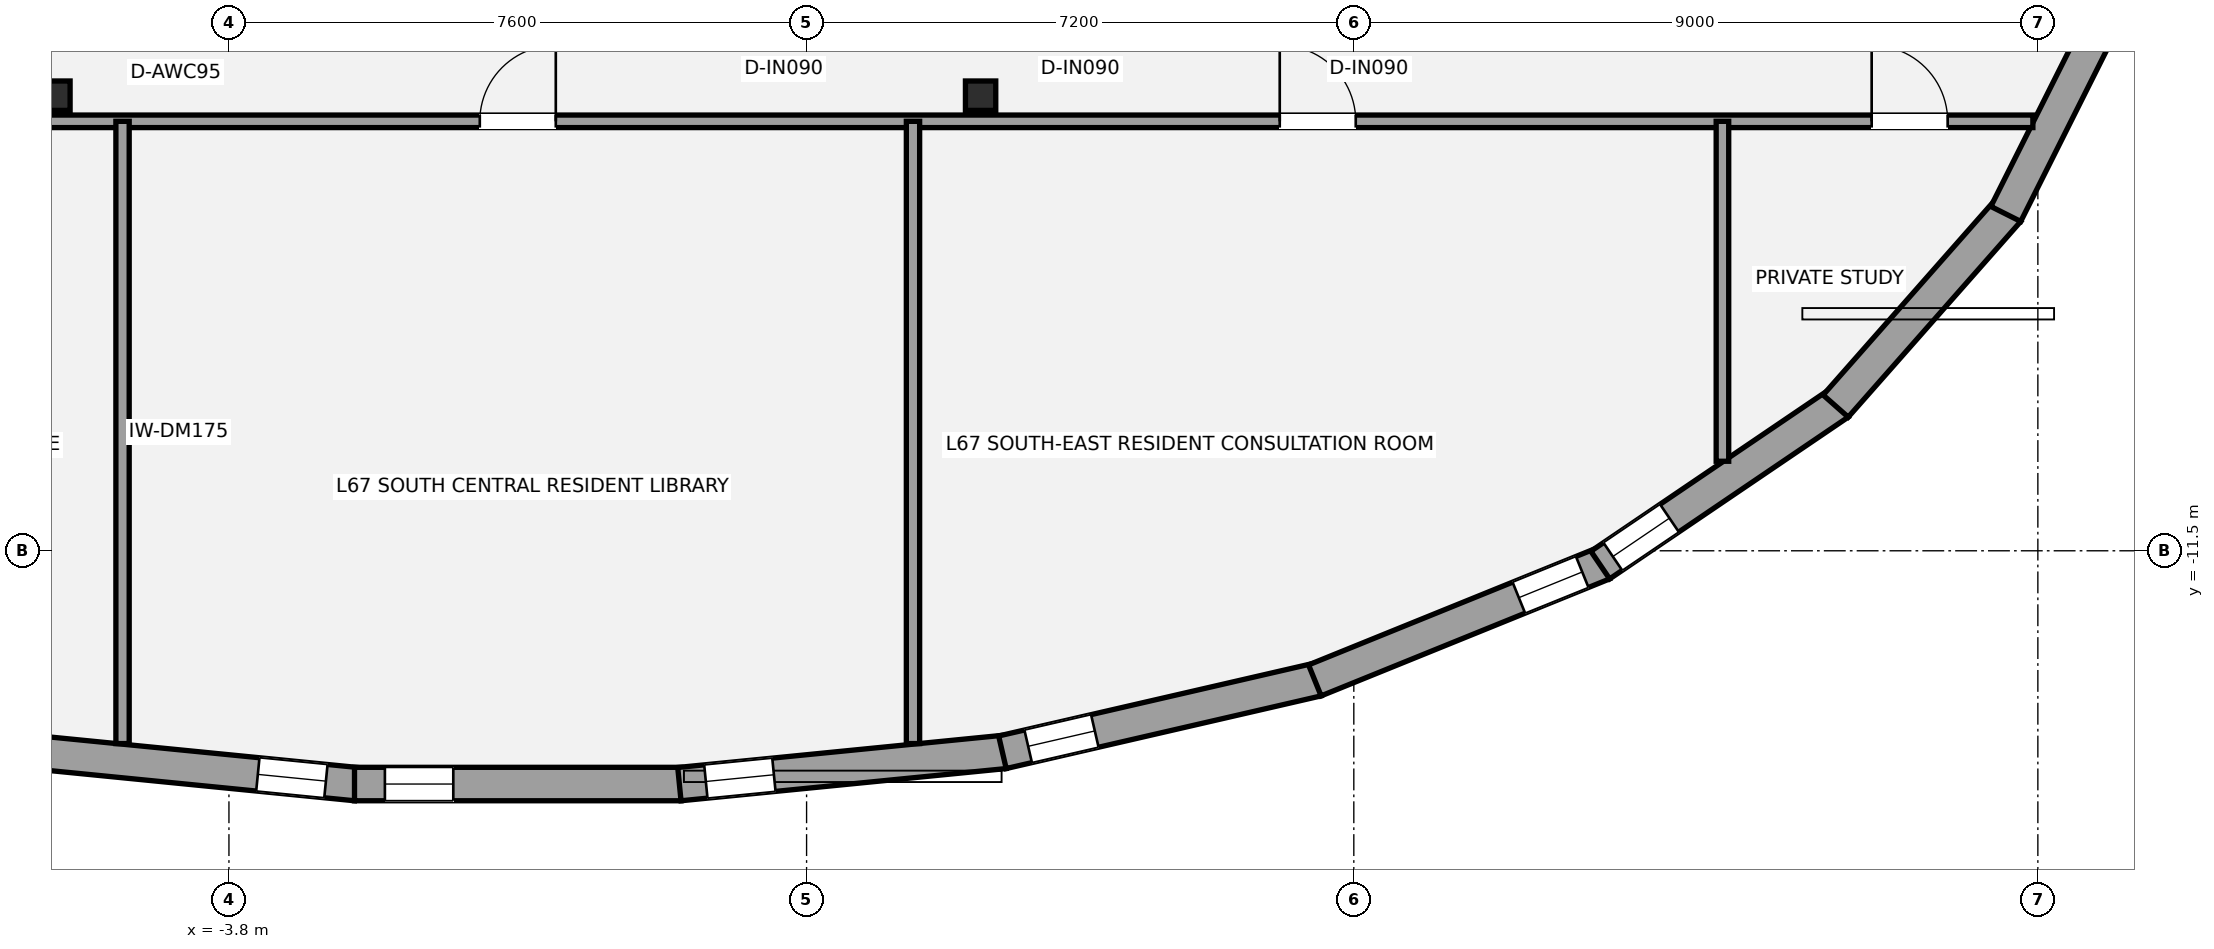
"""IFC4 building model, lengths in metres.
Left out: names, types, materials, properties, quantities, classifications, styles, units other than length and angle.
Written with IfcOpenShell. Run it as: python <this file> out.ifc"""

import sys

from ifc_helpers import new_model, si_unit, direction, frame, frame_2d, origin, origin_2d, place, context, subcontext, project, spatial, rectangle, i_section, extrude, element, fill, save


model = new_model("IFC4")
c1 = context("Model", 3, precision=1e-05, world=origin(), true_north=direction((0.0, 1.0)))
c2 = subcontext(c1, "Body", "Model", "MODEL_VIEW")
j1 = project(units=[si_unit("LENGTHUNIT", "METRE"), si_unit("PLANEANGLEUNIT", "RADIAN")], contexts=[c1])
p1 = place(None, origin())
s1 = spatial("IfcSite", under=j1, at=p1, CompositionType="ELEMENT")
p2 = place(p1, origin())
s2 = spatial("IfcBuilding", under=s1, at=p2, CompositionType="ELEMENT")
p3 = place(p2, frame((0.0, 0.0, 238.35)))
s3 = spatial("IfcBuildingStorey", under=s2, at=p3, CompositionType="ELEMENT", Elevation=238.35)
for number, where, z_axis, x_axis in (
    (1, (-6.09, -5.513, 0.0), (0.0, 0.0, 1.0), (1.0, 0.0, 0.0)),
    (2, (6.09, -5.513, 0.0), (0.0, 0.0, 1.0), (1.0, 0.0, 0.0)),
):
    element("IfcColumn", number, at=place(p3, frame(where, z_axis=z_axis, x_axis=x_axis)), inside=s3, PredefinedType="COLUMN", context=c2, shape_type="SweptSolid", body=[
        extrude(i_section(OverallWidth=0.399, OverallDepth=0.387, WebThickness=0.021, FlangeThickness=0.033, at=origin_2d()), origin(), (0.0, 0.0, 1.0), 3.15),
    ])
p4 = place(p3, frame((-2.126, -14.57, 0.0), z_axis=(0.0, 0.0, 1.0), x_axis=(-0.995134540264, 0.098525361068, 0.0)))
e3 = element("IfcWall", 3, at=p4, inside=s3, PredefinedType="STANDARD", context=c2, shape_type="SweptSolid", body=[
    extrude(rectangle(XDim=4.299, YDim=0.44, at=frame_2d((2.15, 0.0))), origin(), (0.0, 0.0, 1.0), 2.336),
])
p5 = place(p4, frame((0.4, 0.0, 0.58)))
e4 = element("IfcOpeningElement", 4, at=p5, cuts=e3, PredefinedType="OPENING", context=c2, shape_type="SweptSolid", body=[
    extrude(rectangle(XDim=0.9, YDim=1.35, at=frame_2d((0.45, 0.675))), frame((0.0, 0.23, 0.0), z_axis=(0.0, -1.0, 0.0), x_axis=(1.0, 0.0, 0.0)), (0.0, 0.0, 1.0), 0.46),
])
p6 = place(p3, frame((2.148, -14.569, 0.0), z_axis=(0.0, 0.0, 1.0), x_axis=(-1.0, 0.0, 0.0)))
e5 = element("IfcWall", 5, at=p6, inside=s3, PredefinedType="STANDARD", context=c2, shape_type="SweptSolid", body=[
    extrude(rectangle(XDim=4.296, YDim=0.44, at=frame_2d((2.148, 0.0))), origin(), (0.0, 0.0, 1.0), 2.336),
])
p7 = place(p6, frame((2.996, 0.0, 0.58)))
e6 = element("IfcOpeningElement", 6, at=p7, cuts=e5, PredefinedType="OPENING", context=c2, shape_type="SweptSolid", body=[
    extrude(rectangle(XDim=0.9, YDim=1.35, at=frame_2d((0.45, 0.675))), frame((0.0, 0.23, 0.0), z_axis=(0.0, -1.0, 0.0), x_axis=(1.0, 0.0, 0.0)), (0.0, 0.0, 1.0), 0.46),
])
p8 = place(p3, frame((6.405, -14.146, 0.0), z_axis=(0.0, 0.0, 1.0), x_axis=(-0.995134540264, -0.098525361068, 0.0)))
e7 = element("IfcWall", 7, at=p8, inside=s3, PredefinedType="STANDARD", context=c2, shape_type="SweptSolid", body=[
    extrude(rectangle(XDim=4.299, YDim=0.44, at=frame_2d((2.15, 0.0))), origin(), (0.0, 0.0, 1.0), 2.336),
])
p9 = place(p8, frame((3.049, 0.0, 0.58)))
e8 = element("IfcOpeningElement", 8, at=p9, cuts=e7, PredefinedType="OPENING", context=c2, shape_type="SweptSolid", body=[
    extrude(rectangle(XDim=0.9, YDim=1.35, at=frame_2d((0.45, 0.675))), frame((0.0, 0.23, 0.0), z_axis=(0.0, -1.0, 0.0), x_axis=(1.0, 0.0, 0.0)), (0.0, 0.0, 1.0), 0.46),
])
p10 = place(p3, frame((10.52, -13.195, 0.0), z_axis=(0.0, 0.0, 1.0), x_axis=(-0.974398936081, -0.224825962391, 0.0)))
e9 = element("IfcWall", 9, at=p10, inside=s3, PredefinedType="STANDARD", context=c2, shape_type="SweptSolid", body=[
    extrude(rectangle(XDim=4.252, YDim=0.44, at=frame_2d((2.126, 0.0))), origin(), (0.0, 0.0, 1.0), 2.336),
])
p11 = place(p10, frame((3.005, 0.0, 0.58)))
e10 = element("IfcOpeningElement", 10, at=p11, cuts=e9, PredefinedType="OPENING", context=c2, shape_type="SweptSolid", body=[
    extrude(rectangle(XDim=0.9, YDim=1.35, at=frame_2d((0.45, 0.675))), frame((0.0, 0.23, 0.0), z_axis=(0.0, -1.0, 0.0), x_axis=(1.0, 0.0, 0.0)), (0.0, 0.0, 1.0), 0.46),
])
p12 = place(p3, frame((14.283, -11.666, 0.0), z_axis=(0.0, 0.0, 1.0), x_axis=(-0.926731976866, -0.375723093586, 0.0)))
e11 = element("IfcWall", 11, at=p12, inside=s3, PredefinedType="STANDARD", context=c2, shape_type="SweptSolid", body=[
    extrude(rectangle(XDim=4.096, YDim=0.44, at=frame_2d((2.048, 0.0))), origin(), (0.0, 0.0, 1.0), 2.336),
])
p13 = place(p12, frame((0.3, 0.0, 0.58)))
e12 = element("IfcOpeningElement", 12, at=p13, cuts=e11, PredefinedType="OPENING", context=c2, shape_type="SweptSolid", body=[
    extrude(rectangle(XDim=0.9, YDim=1.35, at=frame_2d((0.45, 0.675))), frame((0.0, 0.23, 0.0), z_axis=(0.0, -1.0, 0.0), x_axis=(1.0, 0.0, 0.0)), (0.0, 0.0, 1.0), 0.46),
])
p14 = place(p3, frame((17.381, -9.559, 0.0), z_axis=(0.0, 0.0, 1.0), x_axis=(-0.827637036896, -0.561263694851, 0.0)))
e13 = element("IfcWall", 13, at=p14, inside=s3, PredefinedType="STANDARD", context=c2, shape_type="SweptSolid", body=[
    extrude(rectangle(XDim=3.793, YDim=0.44, at=frame_2d((1.896, 0.0))), origin(), (0.0, 0.0, 1.0), 2.336),
])
p15 = place(p14, frame((2.693, 0.0, 0.58)))
e14 = element("IfcOpeningElement", 14, at=p15, cuts=e13, PredefinedType="OPENING", context=c2, shape_type="SweptSolid", body=[
    extrude(rectangle(XDim=0.9, YDim=1.35, at=frame_2d((0.45, 0.675))), frame((0.0, 0.23, 0.0), z_axis=(0.0, -1.0, 0.0), x_axis=(1.0, 0.0, 0.0)), (0.0, 0.0, 1.0), 0.46),
])
p16 = place(p3, frame((19.61, -7.022, 0.0), z_axis=(0.0, 0.0, 1.0), x_axis=(-0.66136043846, -0.750068243855, 0.0)))
e15 = element("IfcWall", 15, at=p16, inside=s3, PredefinedType="STANDARD", context=c2, shape_type="SweptSolid", body=[
    extrude(rectangle(XDim=3.432, YDim=0.44, at=frame_2d((1.716, 0.0))), origin(), (0.0, 0.0, 1.0), 2.336),
])
p17 = place(p3, frame((20.988, -4.259, 0.0), z_axis=(0.0, 0.0, 1.0), x_axis=(-0.448424724145, -0.893820601002, 0.0)))
e16 = element("IfcWall", 16, at=p17, inside=s3, PredefinedType="STANDARD", context=c2, shape_type="SweptSolid", body=[
    extrude(rectangle(XDim=3.144, YDim=0.44, at=frame_2d((1.572, 0.0))), origin(), (0.0, 0.0, 1.0), 2.336),
])
p18 = place(p3, frame((-19.935, -5.85, 0.0), z_axis=(0.0, 0.0, 1.0), x_axis=(1.0, 0.0, 0.0)))
e17 = element("IfcWall", 17, at=p18, inside=s3, PredefinedType="PARTITIONING", context=c2, shape_type="SweptSolid", body=[
    extrude(rectangle(XDim=39.869, YDim=0.165, at=frame_2d((19.935, 0.0))), origin(), (0.0, 0.0, 1.0), 2.423),
])
p19 = place(p18, frame((1.221, 0.0, 0.0)))
e18 = element("IfcOpeningElement", 18, at=p19, cuts=e17, PredefinedType="OPENING", context=c2, shape_type="SweptSolid", body=[
    extrude(rectangle(XDim=1.0, YDim=2.15, at=frame_2d((0.5, 1.075))), frame((0.0, 0.093, 0.0), z_axis=(0.0, -1.0, 0.0), x_axis=(1.0, 0.0, 0.0)), (0.0, 0.0, 1.0), 0.185),
])
p20 = place(p18, frame((37.748, 0.0, 0.0)))
e19 = element("IfcOpeningElement", 19, at=p20, cuts=e17, PredefinedType="OPENING", context=c2, shape_type="SweptSolid", body=[
    extrude(rectangle(XDim=1.0, YDim=2.15, at=frame_2d((0.5, 1.075))), frame((0.0, 0.093, 0.0), z_axis=(0.0, -1.0, 0.0), x_axis=(1.0, 0.0, 0.0)), (0.0, 0.0, 1.0), 0.185),
])
p21 = place(p18, frame((9.01, 0.0, 0.0)))
e20 = element("IfcOpeningElement", 20, at=p21, cuts=e17, PredefinedType="OPENING", context=c2, shape_type="SweptSolid", body=[
    extrude(rectangle(XDim=1.0, YDim=2.15, at=frame_2d((0.5, 1.075))), frame((0.0, 0.093, 0.0), z_axis=(0.0, -1.0, 0.0), x_axis=(1.0, 0.0, 0.0)), (0.0, 0.0, 1.0), 0.185),
])
p22 = place(p18, frame((19.435, 0.0, 0.0)))
e21 = element("IfcOpeningElement", 21, at=p22, cuts=e17, PredefinedType="OPENING", context=c2, shape_type="SweptSolid", body=[
    extrude(rectangle(XDim=1.0, YDim=2.15, at=frame_2d((0.5, 1.075))), frame((0.0, 0.093, 0.0), z_axis=(0.0, -1.0, 0.0), x_axis=(1.0, 0.0, 0.0)), (0.0, 0.0, 1.0), 0.185),
])
p23 = place(p18, frame((29.96, 0.0, 0.0)))
e22 = element("IfcOpeningElement", 22, at=p23, cuts=e17, PredefinedType="OPENING", context=c2, shape_type="SweptSolid", body=[
    extrude(rectangle(XDim=1.0, YDim=2.15, at=frame_2d((0.5, 1.075))), frame((0.0, 0.093, 0.0), z_axis=(0.0, -1.0, 0.0), x_axis=(1.0, 0.0, 0.0)), (0.0, 0.0, 1.0), 0.185),
])
p24 = place(p3, frame((15.85, -10.322, 0.0), z_axis=(0.0, 0.0, 1.0), x_axis=(0.0, 1.0, 0.0)))
e23 = element("IfcWall", 23, at=p24, inside=s3, PredefinedType="PARTITIONING", context=c2, shape_type="SweptSolid", body=[
    extrude(rectangle(XDim=4.472, YDim=0.165, at=frame_2d((2.236, 0.0))), origin(), (0.0, 0.0, 1.0), 2.423),
])
p25 = place(p3, frame((-5.2, -14.036, 0.0), z_axis=(0.0, 0.0, 1.0), x_axis=(0.0, 1.0, 0.0)))
e24 = element("IfcWall", 24, at=p25, inside=s3, PredefinedType="PARTITIONING", context=c2, shape_type="SweptSolid", body=[
    extrude(rectangle(XDim=8.186, YDim=0.175, at=frame_2d((4.093, 0.0))), origin(), (0.0, 0.0, 1.0), 2.423),
])
p26 = place(p3, frame((5.2, -14.036, 0.0), z_axis=(0.0, 0.0, 1.0), x_axis=(0.0, 1.0, 0.0)))
e25 = element("IfcWall", 25, at=p26, inside=s3, PredefinedType="PARTITIONING", context=c2, shape_type="SweptSolid", body=[
    extrude(rectangle(XDim=8.186, YDim=0.175, at=frame_2d((4.093, 0.0))), origin(), (0.0, 0.0, 1.0), 2.97),
])
p27 = place(p5, origin())
e26 = element("IfcWindow", 26, at=p27, inside=s3, PartitioningType="SINGLE_PANEL", PredefinedType="WINDOW", context=c2, shape_type="SweptSolid", body=[
    extrude(rectangle(XDim=0.9, YDim=1.35, at=frame_2d((0.45, 0.675))), frame((0.0, -0.01, 0.0), z_axis=(0.0, -1.0, 0.0), x_axis=(1.0, 0.0, 0.0)), (0.0, 0.0, 1.0), 0.06),
])
fill(e4, e26)
p28 = place(p7, origin())
e27 = element("IfcWindow", 27, at=p28, inside=s3, PartitioningType="SINGLE_PANEL", PredefinedType="WINDOW", context=c2, shape_type="SweptSolid", body=[
    extrude(rectangle(XDim=0.9, YDim=1.35, at=frame_2d((0.45, 0.675))), frame((0.0, -0.01, 0.0), z_axis=(0.0, -1.0, 0.0), x_axis=(1.0, 0.0, 0.0)), (0.0, 0.0, 1.0), 0.06),
])
fill(e6, e27)
p29 = place(p9, origin())
e28 = element("IfcWindow", 28, at=p29, inside=s3, PartitioningType="SINGLE_PANEL", PredefinedType="WINDOW", context=c2, shape_type="SweptSolid", body=[
    extrude(rectangle(XDim=0.9, YDim=1.35, at=frame_2d((0.45, 0.675))), frame((0.0, -0.01, 0.0), z_axis=(0.0, -1.0, 0.0), x_axis=(1.0, 0.0, 0.0)), (0.0, 0.0, 1.0), 0.06),
])
fill(e8, e28)
p30 = place(p11, origin())
e29 = element("IfcWindow", 29, at=p30, inside=s3, PartitioningType="SINGLE_PANEL", PredefinedType="WINDOW", context=c2, shape_type="SweptSolid", body=[
    extrude(rectangle(XDim=0.9, YDim=1.35, at=frame_2d((0.45, 0.675))), frame((0.0, -0.01, 0.0), z_axis=(0.0, -1.0, 0.0), x_axis=(1.0, 0.0, 0.0)), (0.0, 0.0, 1.0), 0.06),
])
fill(e10, e29)
p31 = place(p13, origin())
e30 = element("IfcWindow", 30, at=p31, inside=s3, PartitioningType="SINGLE_PANEL", PredefinedType="WINDOW", context=c2, shape_type="SweptSolid", body=[
    extrude(rectangle(XDim=0.9, YDim=1.35, at=frame_2d((0.45, 0.675))), frame((0.0, -0.01, 0.0), z_axis=(0.0, -1.0, 0.0), x_axis=(1.0, 0.0, 0.0)), (0.0, 0.0, 1.0), 0.06),
])
fill(e12, e30)
p32 = place(p15, origin())
e31 = element("IfcWindow", 31, at=p32, inside=s3, PartitioningType="SINGLE_PANEL", PredefinedType="WINDOW", context=c2, shape_type="SweptSolid", body=[
    extrude(rectangle(XDim=0.9, YDim=1.35, at=frame_2d((0.45, 0.675))), frame((0.0, -0.01, 0.0), z_axis=(0.0, -1.0, 0.0), x_axis=(1.0, 0.0, 0.0)), (0.0, 0.0, 1.0), 0.06),
])
fill(e14, e31)
p33 = place(p20, origin())
e32 = element("IfcDoor", 32, at=p33, inside=s3, OperationType="SINGLE_SWING_LEFT", PredefinedType="DOOR", context=c2, shape_type="SweptSolid", body=[
    extrude(rectangle(XDim=1.0, YDim=2.15, at=frame_2d((0.5, 1.075))), frame((0.0, 0.025, 0.0), z_axis=(0.0, -1.0, 0.0), x_axis=(1.0, 0.0, 0.0)), (0.0, 0.0, 1.0), 0.05),
])
fill(e19, e32)
p34 = place(p22, origin())
e33 = element("IfcDoor", 33, at=p34, inside=s3, OperationType="SINGLE_SWING_RIGHT", PredefinedType="DOOR", context=c2, shape_type="SweptSolid", body=[
    extrude(rectangle(XDim=1.0, YDim=2.15, at=frame_2d((0.5, 1.075))), frame((0.0, 0.025, 0.0), z_axis=(0.0, -1.0, 0.0), x_axis=(1.0, 0.0, 0.0)), (0.0, 0.0, 1.0), 0.05),
])
fill(e21, e33)
p35 = place(p23, origin())
e34 = element("IfcDoor", 34, at=p35, inside=s3, OperationType="SINGLE_SWING_LEFT", PredefinedType="DOOR", context=c2, shape_type="SweptSolid", body=[
    extrude(rectangle(XDim=1.0, YDim=2.15, at=frame_2d((0.5, 1.075))), frame((0.0, 0.025, 0.0), z_axis=(0.0, -1.0, 0.0), x_axis=(1.0, 0.0, 0.0)), (0.0, 0.0, 1.0), 0.05),
])
fill(e22, e34)
save(model, sys.argv[1])
